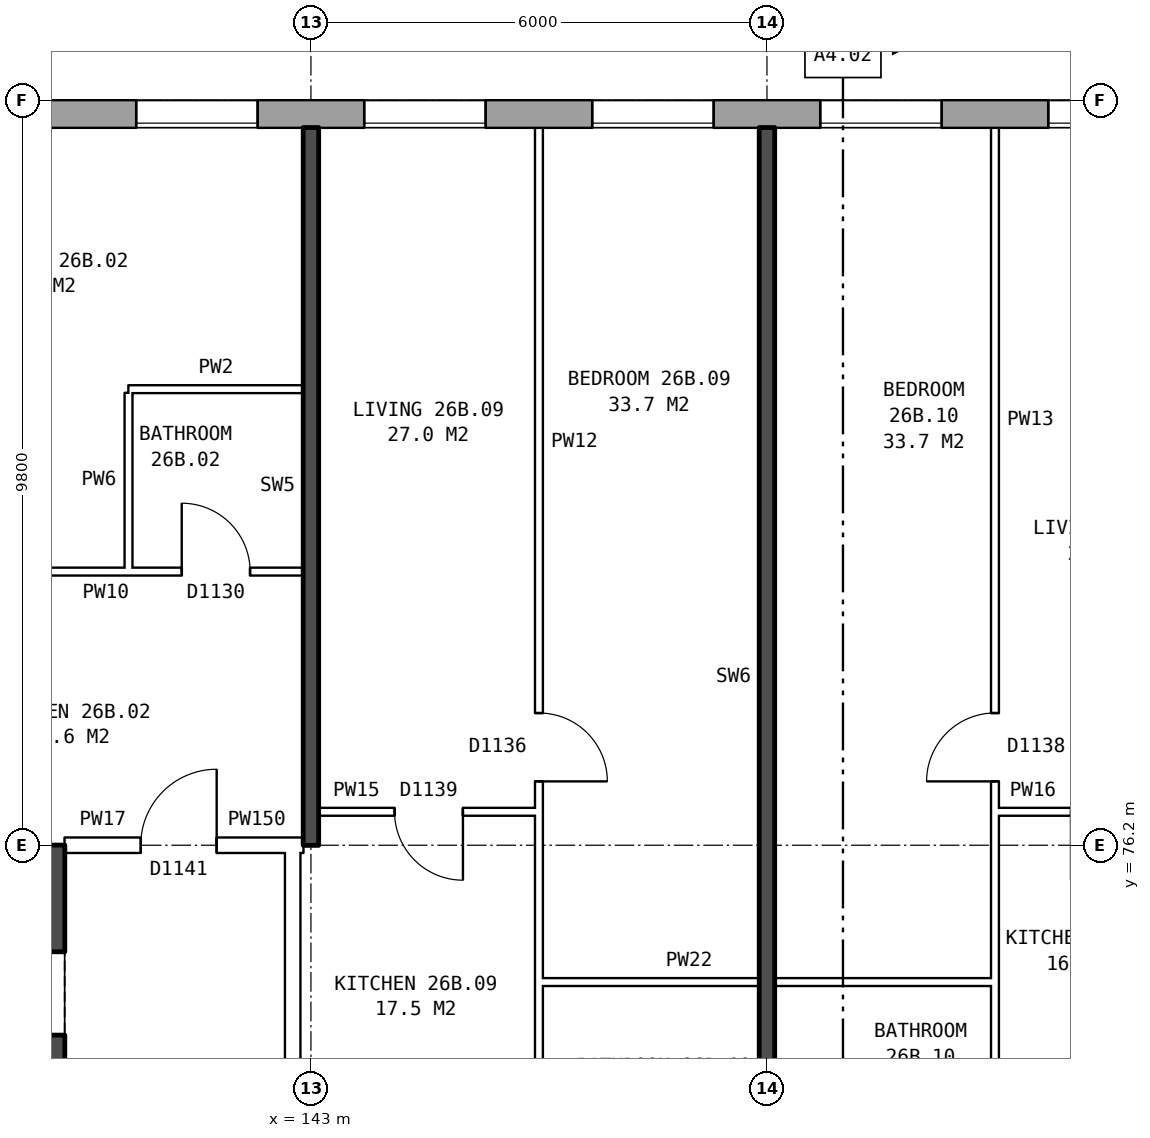
"""IFC4 building model, lengths in metres.
Left out: names, types, materials, properties, quantities, classifications, styles, units other than length and angle.
Written with IfcOpenShell. Run it as: python <this file> out.ifc"""

import sys

from ifc_helpers import new_model, si_unit, direction, frame, frame_2d, origin, place, context, subcontext, project, spatial, rectangle, extrude, element, fill, save


model = new_model("IFC4")
c1 = context("Model", 3, precision=1e-05, world=origin(), true_north=direction((0.0, 1.0)))
c2 = subcontext(c1, "Body", "Model", "MODEL_VIEW")
j1 = project(units=[si_unit("LENGTHUNIT", "METRE"), si_unit("PLANEANGLEUNIT", "RADIAN")], contexts=[c1])
p1 = place(None, origin())
s1 = spatial("IfcSite", under=j1, at=p1, CompositionType="ELEMENT")
p2 = place(p1, origin())
s2 = spatial("IfcBuilding", under=s1, at=p2, CompositionType="ELEMENT")
p3 = place(p2, frame((0.0, 0.0, 96.4)))
s3 = spatial("IfcBuildingStorey", under=s2, at=p3, CompositionType="ELEMENT", Elevation=96.4)
p4 = place(p3, frame((170.925, 85.82, 0.0), z_axis=(0.0, 0.0, 1.0), x_axis=(-1.0, 0.0, 0.0)))
e1 = element("IfcWall", 1, at=p4, inside=s3, PredefinedType="STANDARD", context=c2, shape_type="SweptSolid", body=[
    extrude(rectangle(XDim=36.851, YDim=0.36, at=frame_2d((18.425, 0.0))), origin(), (0.0, 0.0, 1.0), 2.85),
])
p5 = place(p4, frame((1.625, 0.0, 0.8)))
e2 = element("IfcOpeningElement", 2, at=p5, cuts=e1, PredefinedType="OPENING", context=c2, shape_type="SweptSolid", body=[
    extrude(rectangle(XDim=1.6, YDim=1.8, at=frame_2d((0.8, 0.9))), frame((0.0, 0.19, 0.0), z_axis=(0.0, -1.0, 0.0), x_axis=(1.0, 0.0, 0.0)), (0.0, 0.0, 1.0), 0.38),
])
p6 = place(p4, frame((4.625, 0.0, 0.8)))
e3 = element("IfcOpeningElement", 3, at=p6, cuts=e1, PredefinedType="OPENING", context=c2, shape_type="SweptSolid", body=[
    extrude(rectangle(XDim=1.6, YDim=1.8, at=frame_2d((0.8, 0.9))), frame((0.0, 0.19, 0.0), z_axis=(0.0, -1.0, 0.0), x_axis=(1.0, 0.0, 0.0)), (0.0, 0.0, 1.0), 0.38),
])
p7 = place(p4, frame((7.625, 0.0, 0.8)))
e4 = element("IfcOpeningElement", 4, at=p7, cuts=e1, PredefinedType="OPENING", context=c2, shape_type="SweptSolid", body=[
    extrude(rectangle(XDim=1.6, YDim=1.8, at=frame_2d((0.8, 0.9))), frame((0.0, 0.19, 0.0), z_axis=(0.0, -1.0, 0.0), x_axis=(1.0, 0.0, 0.0)), (0.0, 0.0, 1.0), 0.38),
])
p8 = place(p4, frame((10.625, 0.0, 0.8)))
e5 = element("IfcOpeningElement", 5, at=p8, cuts=e1, PredefinedType="OPENING", context=c2, shape_type="SweptSolid", body=[
    extrude(rectangle(XDim=1.6, YDim=1.8, at=frame_2d((0.8, 0.9))), frame((0.0, 0.19, 0.0), z_axis=(0.0, -1.0, 0.0), x_axis=(1.0, 0.0, 0.0)), (0.0, 0.0, 1.0), 0.38),
])
p9 = place(p4, frame((13.625, 0.0, 0.8)))
e6 = element("IfcOpeningElement", 6, at=p9, cuts=e1, PredefinedType="OPENING", context=c2, shape_type="SweptSolid", body=[
    extrude(rectangle(XDim=1.6, YDim=1.8, at=frame_2d((0.8, 0.9))), frame((0.0, 0.19, 0.0), z_axis=(0.0, -1.0, 0.0), x_axis=(1.0, 0.0, 0.0)), (0.0, 0.0, 1.0), 0.38),
])
p10 = place(p4, frame((16.625, 0.0, 0.8)))
e7 = element("IfcOpeningElement", 7, at=p10, cuts=e1, PredefinedType="OPENING", context=c2, shape_type="SweptSolid", body=[
    extrude(rectangle(XDim=1.6, YDim=1.8, at=frame_2d((0.8, 0.9))), frame((0.0, 0.19, 0.0), z_axis=(0.0, -1.0, 0.0), x_axis=(1.0, 0.0, 0.0)), (0.0, 0.0, 1.0), 0.38),
])
p11 = place(p4, frame((19.625, 0.0, 0.8)))
e8 = element("IfcOpeningElement", 8, at=p11, cuts=e1, PredefinedType="OPENING", context=c2, shape_type="SweptSolid", body=[
    extrude(rectangle(XDim=1.6, YDim=1.8, at=frame_2d((0.8, 0.9))), frame((0.0, 0.19, 0.0), z_axis=(0.0, -1.0, 0.0), x_axis=(1.0, 0.0, 0.0)), (0.0, 0.0, 1.0), 0.38),
])
p12 = place(p4, frame((22.625, 0.0, 0.8)))
e9 = element("IfcOpeningElement", 9, at=p12, cuts=e1, PredefinedType="OPENING", context=c2, shape_type="SweptSolid", body=[
    extrude(rectangle(XDim=1.6, YDim=1.8, at=frame_2d((0.8, 0.9))), frame((0.0, 0.19, 0.0), z_axis=(0.0, -1.0, 0.0), x_axis=(1.0, 0.0, 0.0)), (0.0, 0.0, 1.0), 0.38),
])
p13 = place(p4, frame((25.625, 0.0, 0.8)))
e10 = element("IfcOpeningElement", 10, at=p13, cuts=e1, PredefinedType="OPENING", context=c2, shape_type="SweptSolid", body=[
    extrude(rectangle(XDim=1.6, YDim=1.8, at=frame_2d((0.8, 0.9))), frame((0.0, 0.19, 0.0), z_axis=(0.0, -1.0, 0.0), x_axis=(1.0, 0.0, 0.0)), (0.0, 0.0, 1.0), 0.38),
])
p14 = place(p4, frame((28.625, 0.0, 0.8)))
e11 = element("IfcOpeningElement", 11, at=p14, cuts=e1, PredefinedType="OPENING", context=c2, shape_type="SweptSolid", body=[
    extrude(rectangle(XDim=1.6, YDim=1.8, at=frame_2d((0.8, 0.9))), frame((0.0, 0.19, 0.0), z_axis=(0.0, -1.0, 0.0), x_axis=(1.0, 0.0, 0.0)), (0.0, 0.0, 1.0), 0.38),
])
p15 = place(p4, frame((31.625, 0.0, 0.8)))
e12 = element("IfcOpeningElement", 12, at=p15, cuts=e1, PredefinedType="OPENING", context=c2, shape_type="SweptSolid", body=[
    extrude(rectangle(XDim=1.6, YDim=1.8, at=frame_2d((0.8, 0.9))), frame((0.0, 0.19, 0.0), z_axis=(0.0, -1.0, 0.0), x_axis=(1.0, 0.0, 0.0)), (0.0, 0.0, 1.0), 0.38),
])
p16 = place(p4, frame((34.125, 0.0, 0.8)))
e13 = element("IfcOpeningElement", 13, at=p16, cuts=e1, PredefinedType="OPENING", context=c2, shape_type="SweptSolid", body=[
    extrude(rectangle(XDim=1.4, YDim=1.8, at=frame_2d((0.7, 0.9))), frame((0.0, 0.19, 0.0), z_axis=(0.0, -1.0, 0.0), x_axis=(1.0, 0.0, 0.0)), (0.0, 0.0, 1.0), 0.38),
])
p17 = place(p4, frame((35.825, 0.0, 0.8)))
e14 = element("IfcOpeningElement", 14, at=p17, cuts=e1, PredefinedType="OPENING", context=c2, shape_type="SweptSolid", body=[
    extrude(rectangle(XDim=0.6, YDim=1.2, at=frame_2d((0.3, 0.6))), frame((0.0, 0.19, 0.0), z_axis=(0.0, -1.0, 0.0), x_axis=(1.0, 0.0, 0.0)), (0.0, 0.0, 1.0), 0.38),
])
p18 = place(p3, frame((139.435, 64.45, 0.0), z_axis=(0.0, 0.0, 1.0), x_axis=(0.0, 1.0, 0.0)))
e15 = element("IfcWall", 15, at=p18, inside=s3, PredefinedType="SHEAR", context=c2, shape_type="SweptSolid", body=[
    extrude(rectangle(XDim=11.1, YDim=0.65, at=frame_2d((5.55, 0.0))), origin(), (0.0, 0.0, 1.0), 2.85),
])
p19 = place(p18, frame((0.675, 0.0, 0.0)))
e16 = element("IfcOpeningElement", 16, at=p19, cuts=e15, PredefinedType="OPENING", context=c2, shape_type="SweptSolid", body=[
    extrude(rectangle(XDim=1.1, YDim=2.1, at=frame_2d((0.55, 1.05))), frame((0.0, 0.335, 0.0), z_axis=(0.0, -1.0, 0.0), x_axis=(1.0, 0.0, 0.0)), (0.0, 0.0, 1.0), 0.67),
])
p20 = place(p18, frame((9.25, 0.0, 0.0)))
e17 = element("IfcOpeningElement", 17, at=p20, cuts=e15, PredefinedType="OPENING", context=c2, shape_type="SweptSolid", body=[
    extrude(rectangle(XDim=1.1, YDim=2.1, at=frame_2d((0.55, 1.05))), frame((0.0, 0.335, 0.0), z_axis=(0.0, -1.0, 0.0), x_axis=(1.0, 0.0, 0.0)), (0.0, 0.0, 1.0), 0.67),
])
p21 = place(p18, frame((7.475, 0.0, 0.0)))
e18 = element("IfcOpeningElement", 18, at=p21, cuts=e15, PredefinedType="OPENING", context=c2, shape_type="SweptSolid", body=[
    extrude(rectangle(XDim=0.85, YDim=2.1, at=frame_2d((0.425, 1.05))), frame((0.0, 0.335, 0.0), z_axis=(0.0, -1.0, 0.0), x_axis=(1.0, 0.0, 0.0)), (0.0, 0.0, 1.0), 0.67),
])
p22 = place(p3, frame((139.76, 75.875, 0.0), z_axis=(0.0, 0.0, 1.0), x_axis=(-1.0, 0.0, 0.0)))
e19 = element("IfcWall", 19, at=p22, inside=s3, PredefinedType="SHEAR", context=c2, shape_type="SweptSolid", body=[
    extrude(rectangle(XDim=8.4, YDim=0.65, at=frame_2d((4.2, 0.0))), origin(), (0.0, 0.0, 1.0), 2.85),
])
p23 = place(p3, frame((142.76, 63.9, 0.0), z_axis=(0.0, 0.0, 1.0), x_axis=(0.0, 1.0, 0.0)))
e20 = element("IfcWall", 20, at=p23, inside=s3, PredefinedType="PARTITIONING", context=c2, shape_type="SweptSolid", body=[
    extrude(rectangle(XDim=12.2, YDim=0.2, at=frame_2d((6.1, 0.0))), origin(), (0.0, 0.0, 1.0), 2.85),
])
p24 = place(p23, frame((5.1, 0.0, 0.0)))
e21 = element("IfcOpeningElement", 21, at=p24, cuts=e20, PredefinedType="OPENING", context=c2, shape_type="SweptSolid", body=[
    extrude(rectangle(XDim=2.0, YDim=2.1, at=frame_2d((1.0, 1.05))), frame((0.0, 0.11, 0.0), z_axis=(0.0, -1.0, 0.0), x_axis=(1.0, 0.0, 0.0)), (0.0, 0.0, 1.0), 0.22),
])
p25 = place(p3, frame((146.0, 74.4, 0.0), z_axis=(0.0, 0.0, 1.0), x_axis=(1.0, 0.0, 0.0)))
e22 = element("IfcWall", 22, at=p25, inside=s3, PredefinedType="PARTITIONING", context=c2, shape_type="SweptSolid", body=[
    extrude(rectangle(XDim=6.0, YDim=0.1, at=frame_2d((3.0, 0.0))), origin(), (0.0, 0.0, 1.0), 2.85),
])
p26 = place(p3, frame((139.76, 76.2, 0.0), z_axis=(0.0, 0.0, 1.0), x_axis=(1.0, 0.0, 0.0)))
e23 = element("IfcWall", 23, at=p26, inside=s3, PredefinedType="PARTITIONING", context=c2, shape_type="SweptSolid", body=[
    extrude(rectangle(XDim=3.0, YDim=0.2, at=frame_2d((1.5, 0.0))), origin(), (0.0, 0.0, 1.0), 2.85),
])
p27 = place(p26, frame((1.0, 0.0, 0.0)))
e24 = element("IfcOpeningElement", 24, at=p27, cuts=e23, PredefinedType="OPENING", context=c2, shape_type="SweptSolid", body=[
    extrude(rectangle(XDim=1.0, YDim=2.1, at=frame_2d((0.5, 1.05))), frame((0.0, 0.11, 0.0), z_axis=(0.0, -1.0, 0.0), x_axis=(1.0, 0.0, 0.0)), (0.0, 0.0, 1.0), 0.22),
])
p28 = place(p3, frame((142.76, 76.2, 0.0), z_axis=(0.0, 0.0, 1.0), x_axis=(1.0, 0.0, 0.0)))
e25 = element("IfcWall", 25, at=p28, inside=s3, PredefinedType="PARTITIONING", context=c2, shape_type="SweptSolid", body=[
    extrude(rectangle(XDim=0.14, YDim=0.2, at=frame_2d((0.07, 0.0))), origin(), (0.0, 0.0, 1.0), 2.85),
])
p29 = place(p3, frame((143.1, 76.64, 0.0), z_axis=(0.0, 0.0, 1.0), x_axis=(1.0, 0.0, 0.0)))
e26 = element("IfcWall", 26, at=p29, inside=s3, PredefinedType="PARTITIONING", context=c2, shape_type="SweptSolid", body=[
    extrude(rectangle(XDim=2.9, YDim=0.1, at=frame_2d((1.45, 0.0))), origin(), (0.0, 0.0, 1.0), 2.85),
])
p30 = place(p29, frame((1.0, 0.0, 0.0)))
e27 = element("IfcOpeningElement", 27, at=p30, cuts=e26, PredefinedType="OPENING", context=c2, shape_type="SweptSolid", body=[
    extrude(rectangle(XDim=0.9, YDim=2.1, at=frame_2d((0.45, 1.05))), frame((0.0, 0.06, 0.0), z_axis=(0.0, -1.0, 0.0), x_axis=(1.0, 0.0, 0.0)), (0.0, 0.0, 1.0), 0.12),
])
p31 = place(p3, frame((152.0, 76.64, 0.0), z_axis=(0.0, 0.0, 1.0), x_axis=(1.0, 0.0, 0.0)))
e28 = element("IfcWall", 28, at=p31, inside=s3, PredefinedType="PARTITIONING", context=c2, shape_type="SweptSolid", body=[
    extrude(rectangle(XDim=2.9, YDim=0.1, at=frame_2d((1.45, 0.0))), origin(), (0.0, 0.0, 1.0), 2.85),
])
p32 = place(p31, frame((1.0, 0.0, 0.0)))
e29 = element("IfcOpeningElement", 29, at=p32, cuts=e28, PredefinedType="OPENING", context=c2, shape_type="SweptSolid", body=[
    extrude(rectangle(XDim=0.9, YDim=2.1, at=frame_2d((0.45, 1.05))), frame((0.0, 0.06, 0.0), z_axis=(0.0, -1.0, 0.0), x_axis=(1.0, 0.0, 0.0)), (0.0, 0.0, 1.0), 0.12),
])
p33 = place(p3, frame((137.1, 79.8, 0.0), z_axis=(0.0, 0.0, 1.0), x_axis=(1.0, 0.0, 0.0)))
e30 = element("IfcWall", 30, at=p33, inside=s3, PredefinedType="PARTITIONING", context=c2, shape_type="SweptSolid", body=[
    extrude(rectangle(XDim=5.8, YDim=0.1, at=frame_2d((2.9, 0.0))), origin(), (0.0, 0.0, 1.0), 2.85),
])
p34 = place(p33, frame((1.3, 0.0, 0.0)))
e31 = element("IfcOpeningElement", 31, at=p34, cuts=e30, PredefinedType="OPENING", context=c2, shape_type="SweptSolid", body=[
    extrude(rectangle(XDim=0.9, YDim=2.1, at=frame_2d((0.45, 1.05))), frame((0.0, 0.06, 0.0), z_axis=(0.0, -1.0, 0.0), x_axis=(1.0, 0.0, 0.0)), (0.0, 0.0, 1.0), 0.12),
])
p35 = place(p33, frame((4.2, 0.0, 0.0)))
e32 = element("IfcOpeningElement", 32, at=p35, cuts=e30, PredefinedType="OPENING", context=c2, shape_type="SweptSolid", body=[
    extrude(rectangle(XDim=0.9, YDim=2.1, at=frame_2d((0.45, 1.05))), frame((0.0, 0.06, 0.0), z_axis=(0.0, -1.0, 0.0), x_axis=(1.0, 0.0, 0.0)), (0.0, 0.0, 1.0), 0.12),
])
for number, where, z_axis, x_axis in (
    (33, (140.6, 82.2, 0.0), (0.0, 0.0, 1.0), (1.0, 0.0, 0.0)),
    (34, (140.6, 79.85, 0.0), (0.0, 0.0, 1.0), (0.0, 1.0, 0.0)),
):
    element("IfcWall", number, at=place(p3, frame(where, z_axis=z_axis, x_axis=x_axis)), inside=s3, PredefinedType="PARTITIONING", context=c2, shape_type="SweptSolid", body=[
        extrude(rectangle(XDim=2.3, YDim=0.1, at=frame_2d((1.15, 0.0))), origin(), (0.0, 0.0, 1.0), 2.85),
    ])
p36 = place(p3, frame((143.0, 76.2, 0.0), z_axis=(0.0, 0.0, 1.0), x_axis=(0.0, 1.0, 0.0)))
e35 = element("IfcWall", 35, at=p36, inside=s3, PredefinedType="SOLIDWALL", context=c2, shape_type="SweptSolid", body=[
    extrude(rectangle(XDim=9.44, YDim=0.2, at=frame_2d((4.72, 0.0))), origin(), (0.0, 0.0, 1.0), 2.85),
])
p37 = place(p3, frame((146.0, 71.3, 0.0), z_axis=(0.0, 0.0, 1.0), x_axis=(0.0, 1.0, 0.0)))
e36 = element("IfcWall", 36, at=p37, inside=s3, PredefinedType="PARTITIONING", context=c2, shape_type="SweptSolid", body=[
    extrude(rectangle(XDim=14.34, YDim=0.1, at=frame_2d((7.17, 0.0))), origin(), (0.0, 0.0, 1.0), 2.85),
])
p38 = place(p37, frame((5.74, 0.0, 0.0)))
e37 = element("IfcOpeningElement", 37, at=p38, cuts=e36, PredefinedType="OPENING", context=c2, shape_type="SweptSolid", body=[
    extrude(rectangle(XDim=0.9, YDim=2.1, at=frame_2d((0.45, 1.05))), frame((0.0, 0.06, 0.0), z_axis=(0.0, -1.0, 0.0), x_axis=(1.0, 0.0, 0.0)), (0.0, 0.0, 1.0), 0.12),
])
p39 = place(p37, frame((0.4, 0.0, 0.0)))
e38 = element("IfcOpeningElement", 38, at=p39, cuts=e36, PredefinedType="OPENING", context=c2, shape_type="SweptSolid", body=[
    extrude(rectangle(XDim=0.9, YDim=2.1, at=frame_2d((0.45, 1.05))), frame((0.0, 0.06, 0.0), z_axis=(0.0, -1.0, 0.0), x_axis=(1.0, 0.0, 0.0)), (0.0, 0.0, 1.0), 0.12),
])
p40 = place(p3, frame((149.0, 71.2, 0.0), z_axis=(0.0, 0.0, 1.0), x_axis=(0.0, 1.0, 0.0)))
e39 = element("IfcWall", 39, at=p40, inside=s3, PredefinedType="SOLIDWALL", context=c2, shape_type="SweptSolid", body=[
    extrude(rectangle(XDim=14.44, YDim=0.2, at=frame_2d((7.22, 0.0))), origin(), (0.0, 0.0, 1.0), 2.85),
])
p41 = place(p3, frame((152.0, 71.3, 0.0), z_axis=(0.0, 0.0, 1.0), x_axis=(0.0, 1.0, 0.0)))
e40 = element("IfcWall", 40, at=p41, inside=s3, PredefinedType="PARTITIONING", context=c2, shape_type="SweptSolid", body=[
    extrude(rectangle(XDim=14.34, YDim=0.1, at=frame_2d((7.17, 0.0))), origin(), (0.0, 0.0, 1.0), 2.85),
])
p42 = place(p41, frame((5.74, 0.0, 0.0)))
e41 = element("IfcOpeningElement", 41, at=p42, cuts=e40, PredefinedType="OPENING", context=c2, shape_type="SweptSolid", body=[
    extrude(rectangle(XDim=0.9, YDim=2.1, at=frame_2d((0.45, 1.05))), frame((0.0, 0.06, 0.0), z_axis=(0.0, -1.0, 0.0), x_axis=(1.0, 0.0, 0.0)), (0.0, 0.0, 1.0), 0.12),
])
p43 = place(p41, frame((0.4, 0.0, 0.0)))
e42 = element("IfcOpeningElement", 42, at=p43, cuts=e40, PredefinedType="OPENING", context=c2, shape_type="SweptSolid", body=[
    extrude(rectangle(XDim=0.9, YDim=2.1, at=frame_2d((0.45, 1.05))), frame((0.0, 0.06, 0.0), z_axis=(0.0, -1.0, 0.0), x_axis=(1.0, 0.0, 0.0)), (0.0, 0.0, 1.0), 0.12),
])
p44 = place(p10, origin())
e43 = element("IfcWindow", 43, at=p44, inside=s3, PartitioningType="SINGLE_PANEL", PredefinedType="WINDOW", context=c2, shape_type="SweptSolid", body=[
    extrude(rectangle(XDim=1.6, YDim=1.8, at=frame_2d((0.8, 0.9))), frame((0.0, 0.15, 0.0), z_axis=(0.0, -1.0, 0.0), x_axis=(1.0, 0.0, 0.0)), (0.0, 0.0, 1.0), 0.06),
])
fill(e7, e43)
p45 = place(p11, origin())
e44 = element("IfcWindow", 44, at=p45, inside=s3, PartitioningType="SINGLE_PANEL", PredefinedType="WINDOW", context=c2, shape_type="SweptSolid", body=[
    extrude(rectangle(XDim=1.6, YDim=1.8, at=frame_2d((0.8, 0.9))), frame((0.0, 0.15, 0.0), z_axis=(0.0, -1.0, 0.0), x_axis=(1.0, 0.0, 0.0)), (0.0, 0.0, 1.0), 0.06),
])
fill(e8, e44)
p46 = place(p12, origin())
e45 = element("IfcWindow", 45, at=p46, inside=s3, PartitioningType="SINGLE_PANEL", PredefinedType="WINDOW", context=c2, shape_type="SweptSolid", body=[
    extrude(rectangle(XDim=1.6, YDim=1.8, at=frame_2d((0.8, 0.9))), frame((0.0, 0.15, 0.0), z_axis=(0.0, -1.0, 0.0), x_axis=(1.0, 0.0, 0.0)), (0.0, 0.0, 1.0), 0.06),
])
fill(e9, e45)
p47 = place(p13, origin())
e46 = element("IfcWindow", 46, at=p47, inside=s3, PartitioningType="SINGLE_PANEL", PredefinedType="WINDOW", context=c2, shape_type="SweptSolid", body=[
    extrude(rectangle(XDim=1.6, YDim=1.8, at=frame_2d((0.8, 0.9))), frame((0.0, 0.15, 0.0), z_axis=(0.0, -1.0, 0.0), x_axis=(1.0, 0.0, 0.0)), (0.0, 0.0, 1.0), 0.06),
])
fill(e10, e46)
p48 = place(p14, origin())
e47 = element("IfcWindow", 47, at=p48, inside=s3, PartitioningType="SINGLE_PANEL", PredefinedType="WINDOW", context=c2, shape_type="SweptSolid", body=[
    extrude(rectangle(XDim=1.6, YDim=1.8, at=frame_2d((0.8, 0.9))), frame((0.0, 0.15, 0.0), z_axis=(0.0, -1.0, 0.0), x_axis=(1.0, 0.0, 0.0)), (0.0, 0.0, 1.0), 0.06),
])
fill(e11, e47)
p49 = place(p27, origin())
e48 = element("IfcDoor", 48, at=p49, inside=s3, OperationType="SINGLE_SWING_RIGHT", PredefinedType="DOOR", context=c2, shape_type="SweptSolid", body=[
    extrude(rectangle(XDim=1.0, YDim=2.1, at=frame_2d((0.5, 1.05))), frame((0.0, 0.025, 0.0), z_axis=(0.0, -1.0, 0.0), x_axis=(1.0, 0.0, 0.0)), (0.0, 0.0, 1.0), 0.05),
])
fill(e24, e48)
p50 = place(p35, origin())
e49 = element("IfcDoor", 49, at=p50, inside=s3, OperationType="SINGLE_SWING_LEFT", PredefinedType="DOOR", context=c2, shape_type="SweptSolid", body=[
    extrude(rectangle(XDim=0.9, YDim=2.1, at=frame_2d((0.45, 1.05))), frame((0.0, 0.025, 0.0), z_axis=(0.0, -1.0, 0.0), x_axis=(1.0, 0.0, 0.0)), (0.0, 0.0, 1.0), 0.05),
])
fill(e32, e49)
p51 = place(p38, frame((0.9, 0.0, 0.0), z_axis=(0.0, 0.0, 1.0), x_axis=(-1.0, 0.0, 0.0)))
e50 = element("IfcDoor", 50, at=p51, inside=s3, OperationType="SINGLE_SWING_RIGHT", PredefinedType="DOOR", context=c2, shape_type="SweptSolid", body=[
    extrude(rectangle(XDim=0.9, YDim=2.1, at=frame_2d((0.45, 1.05))), frame((0.0, 0.025, 0.0), z_axis=(0.0, -1.0, 0.0), x_axis=(1.0, 0.0, 0.0)), (0.0, 0.0, 1.0), 0.05),
])
fill(e37, e50)
p52 = place(p30, frame((0.9, 0.0, 0.0), z_axis=(0.0, 0.0, 1.0), x_axis=(-1.0, 0.0, 0.0)))
e51 = element("IfcDoor", 51, at=p52, inside=s3, OperationType="SINGLE_SWING_LEFT", PredefinedType="DOOR", context=c2, shape_type="SweptSolid", body=[
    extrude(rectangle(XDim=0.9, YDim=2.1, at=frame_2d((0.45, 1.05))), frame((0.0, 0.025, 0.0), z_axis=(0.0, -1.0, 0.0), x_axis=(1.0, 0.0, 0.0)), (0.0, 0.0, 1.0), 0.05),
])
fill(e27, e51)
p53 = place(p42, origin())
e52 = element("IfcDoor", 52, at=p53, inside=s3, OperationType="SINGLE_SWING_LEFT", PredefinedType="DOOR", context=c2, shape_type="SweptSolid", body=[
    extrude(rectangle(XDim=0.9, YDim=2.1, at=frame_2d((0.45, 1.05))), frame((0.0, 0.025, 0.0), z_axis=(0.0, -1.0, 0.0), x_axis=(1.0, 0.0, 0.0)), (0.0, 0.0, 1.0), 0.05),
])
fill(e41, e52)
save(model, sys.argv[1])
